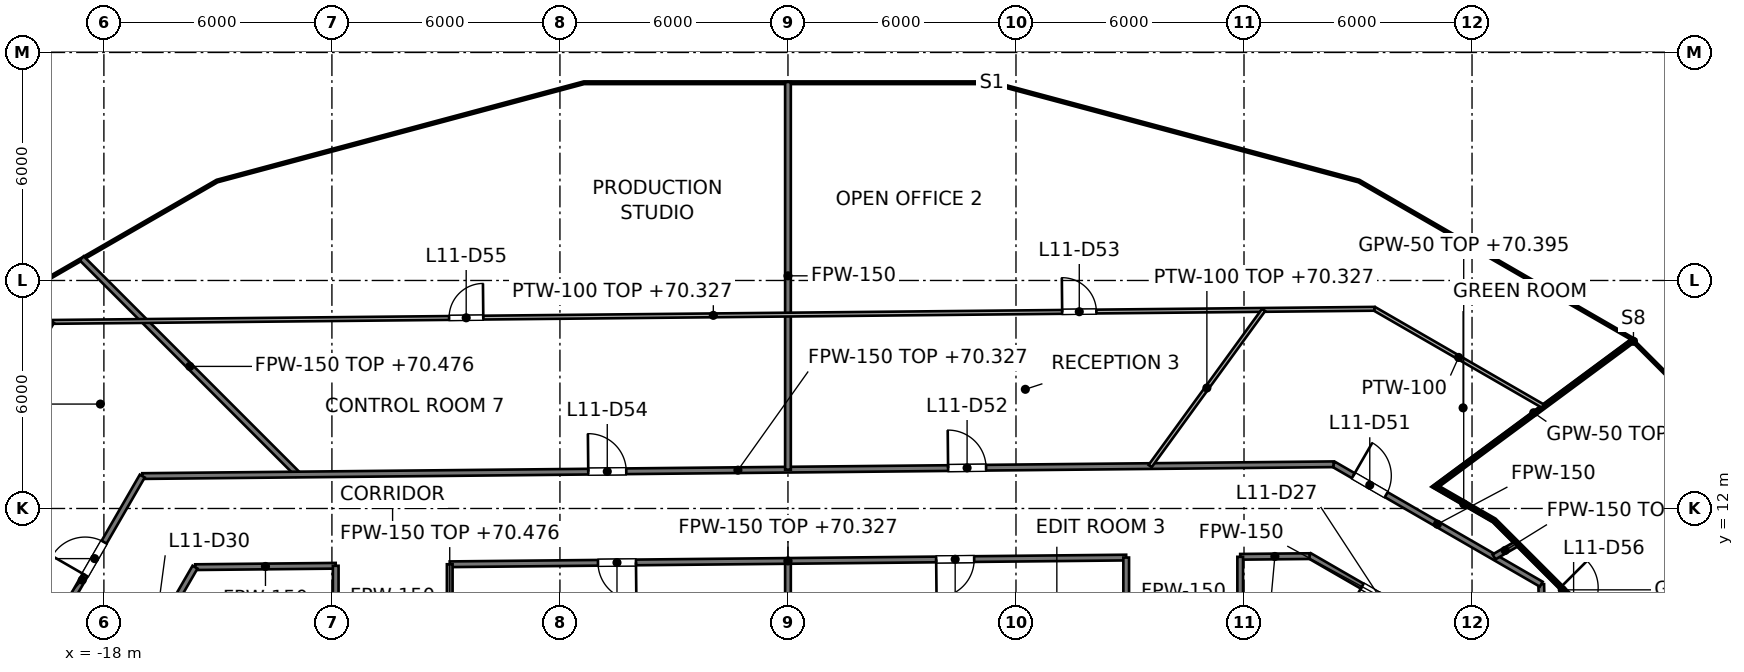
"""IFC4 building model, lengths in metres.
Left out: names, types, materials, properties, quantities, classifications, styles, units other than length and angle.
Written with IfcOpenShell. Run it as: python <this file> out.ifc"""

import sys

from ifc_helpers import new_model, si_unit, direction, frame, frame_2d, origin, place, context, subcontext, project, spatial, rectangle, extrude, element, fill, save


model = new_model("IFC4")
c1 = context("Model", 3, precision=1e-05, world=origin(), true_north=direction((0.0, 1.0)))
c2 = subcontext(c1, "Body", "Model", "MODEL_VIEW")
j1 = project(units=[si_unit("LENGTHUNIT", "METRE"), si_unit("PLANEANGLEUNIT", "RADIAN")], contexts=[c1])
p1 = place(None, origin())
s1 = spatial("IfcSite", under=j1, at=p1, CompositionType="ELEMENT")
p2 = place(p1, origin())
s2 = spatial("IfcBuilding", under=s1, at=p2, CompositionType="ELEMENT")
p3 = place(p2, frame((0.0, 0.0, 67.2)))
s3 = spatial("IfcBuildingStorey", under=s2, at=p3, CompositionType="ELEMENT", Elevation=67.2)
p4 = place(p3, frame((19.821, 10.008, 0.0), z_axis=(0.0, 0.0, 1.0), x_axis=(0.020552957546, -0.999788765658, 0.0)))
e1 = element("IfcWall", 1, at=p4, inside=s3, PredefinedType="PARTITIONING", context=c2, shape_type="SweptSolid", body=[
    extrude(rectangle(XDim=17.343, YDim=0.15, at=frame_2d((8.671, 0.0))), origin(), (0.0, 0.0, 1.0), 3.127),
])
p5 = place(p4, frame((11.677, 0.0, 0.0)))
e2 = element("IfcOpeningElement", 2, at=p5, cuts=e1, PredefinedType="OPENING", context=c2, shape_type="SweptSolid", body=[
    extrude(rectangle(XDim=1.0, YDim=2.1, at=frame_2d((0.5, 1.05))), frame((0.0, 0.075, 0.0), z_axis=(0.0, -1.0, 0.0), x_axis=(1.0, 0.0, 0.0)), (0.0, 0.0, 1.0), 0.15),
])
p6 = place(p4, frame((4.113, 0.0, 0.0)))
e3 = element("IfcOpeningElement", 3, at=p6, cuts=e1, PredefinedType="OPENING", context=c2, shape_type="SweptSolid", body=[
    extrude(rectangle(XDim=1.0, YDim=2.1, at=frame_2d((0.5, 1.05))), frame((0.0, 0.075, 0.0), z_axis=(0.0, -1.0, 0.0), x_axis=(1.0, 0.0, 0.0)), (0.0, 0.0, 1.0), 0.15),
])
p7 = place(p3, frame((-18.584, 18.584, 0.0), z_axis=(0.0, 0.0, 1.0), x_axis=(0.707106781187, -0.707106781187, 0.0)))
e4 = element("IfcWall", 4, at=p7, inside=s3, PredefinedType="PARTITIONING", context=c2, shape_type="SweptSolid", body=[
    extrude(rectangle(XDim=8.047, YDim=0.15, at=frame_2d((4.023, 0.0))), origin(), (0.0, 0.0, 1.0), 3.276),
])
p8 = place(p3, frame((13.724, 10.757, 0.0), z_axis=(0.0, 0.0, 1.0), x_axis=(0.86594264414, -0.500143316521, 0.0)))
e5 = element("IfcWall", 5, at=p8, inside=s3, PredefinedType="PARTITIONING", context=c2, shape_type="SweptSolid", body=[
    extrude(rectangle(XDim=4.302, YDim=0.15, at=frame_2d((2.151, 0.0))), origin(), (0.0, 0.0, 1.0), 3.195),
])
p9 = place(p8, frame((1.602, 0.0, 0.0)))
e6 = element("IfcOpeningElement", 6, at=p9, cuts=e5, PredefinedType="OPENING", context=c2, shape_type="SweptSolid", body=[
    extrude(rectangle(XDim=1.0, YDim=2.1, at=frame_2d((0.5, 1.05))), frame((0.0, 0.075, 0.0), z_axis=(0.0, -1.0, 0.0), x_axis=(1.0, 0.0, 0.0)), (0.0, 0.0, 1.0), 0.15),
])
p10 = place(p3, frame((14.356, 13.164, 0.0), z_axis=(0.0, 0.0, 1.0), x_axis=(0.865974907157, -0.500087452527, 0.0)))
e7 = element("IfcWall", 7, at=p10, inside=s3, PredefinedType="PARTITIONING", context=c2, shape_type="SweptSolid", body=[
    extrude(rectangle(XDim=6.311, YDim=0.15, at=frame_2d((3.155, 0.0))), origin(), (0.0, 0.0, 1.0), 3.195),
])
p11 = place(p10, frame((0.601, 0.0, 0.0)))
e8 = element("IfcOpeningElement", 8, at=p11, cuts=e7, PredefinedType="OPENING", context=c2, shape_type="SweptSolid", body=[
    extrude(rectangle(XDim=1.0, YDim=2.1, at=frame_2d((0.5, 1.05))), frame((0.0, 0.075, 0.0), z_axis=(0.0, -1.0, 0.0), x_axis=(1.0, 0.0, 0.0)), (0.0, 0.0, 1.0), 0.15),
])
p12 = place(p3, frame((-15.597, 10.456, 0.0), z_axis=(0.0, 0.0, 1.0), x_axis=(0.999950943482, 0.009905080996, 0.0)))
e9 = element("IfcWall", 9, at=p12, inside=s3, PredefinedType="PARTITIONING", context=c2, shape_type="SweptSolid", body=[
    extrude(rectangle(XDim=3.697, YDim=0.15, at=frame_2d((1.849, 0.0))), origin(), (0.0, 0.0, 1.0), 3.195),
])
p13 = place(p3, frame((-8.9, 10.532, 0.0), z_axis=(0.0, 0.0, 1.0), x_axis=(0.999950834077, 0.009916119672, 0.0)))
e10 = element("IfcWall", 10, at=p13, inside=s3, PredefinedType="PARTITIONING", context=c2, shape_type="SweptSolid", body=[
    extrude(rectangle(XDim=17.801, YDim=0.15, at=frame_2d((8.9, 0.0))), origin(), (0.0, 0.0, 1.0), 3.127),
])
p14 = place(p13, frame((12.8, 0.0, 0.0)))
e11 = element("IfcOpeningElement", 11, at=p14, cuts=e10, PredefinedType="OPENING", context=c2, shape_type="SweptSolid", body=[
    extrude(rectangle(XDim=1.0, YDim=2.1, at=frame_2d((0.5, 1.05))), frame((0.0, 0.075, 0.0), z_axis=(0.0, -1.0, 0.0), x_axis=(1.0, 0.0, 0.0)), (0.0, 0.0, 1.0), 0.15),
])
p15 = place(p13, frame((3.901, 0.0, 0.0)))
e12 = element("IfcOpeningElement", 12, at=p15, cuts=e10, PredefinedType="OPENING", context=c2, shape_type="SweptSolid", body=[
    extrude(rectangle(XDim=1.0, YDim=2.1, at=frame_2d((0.5, 1.05))), frame((0.0, 0.075, 0.0), z_axis=(0.0, -1.0, 0.0), x_axis=(1.0, 0.0, 0.0)), (0.0, 0.0, 1.0), 0.15),
])
p16 = place(p3, frame((11.9, 10.728, 0.0), z_axis=(0.0, 0.0, 1.0), x_axis=(0.999950962562, 0.009903154608, 0.0)))
e13 = element("IfcWall", 13, at=p16, inside=s3, PredefinedType="PARTITIONING", context=c2, shape_type="SweptSolid", body=[
    extrude(rectangle(XDim=1.824, YDim=0.15, at=frame_2d((0.912, 0.0))), origin(), (0.0, 0.0, 1.0), 4.05),
])
p17 = place(p3, frame((-16.99, 12.853, 0.0), z_axis=(0.0, 0.0, 1.0), x_axis=(0.999950928474, 0.009906596006, 0.0)))
e14 = element("IfcWall", 14, at=p17, inside=s3, PredefinedType="PARTITIONING", context=c2, shape_type="SweptSolid", body=[
    extrude(rectangle(XDim=31.347, YDim=0.15, at=frame_2d((15.674, 0.0))), origin(), (0.0, 0.0, 1.0), 3.127),
])
p18 = place(p17, frame((21.205, 0.0, 0.0)))
e15 = element("IfcOpeningElement", 15, at=p18, cuts=e14, PredefinedType="OPENING", context=c2, shape_type="SweptSolid", body=[
    extrude(rectangle(XDim=1.0, YDim=2.1, at=frame_2d((0.5, 1.05))), frame((0.0, 0.075, 0.0), z_axis=(0.0, -1.0, 0.0), x_axis=(1.0, 0.0, 0.0)), (0.0, 0.0, 1.0), 0.15),
])
p19 = place(p17, frame((11.736, 0.0, 0.0)))
e16 = element("IfcOpeningElement", 16, at=p19, cuts=e14, PredefinedType="OPENING", context=c2, shape_type="SweptSolid", body=[
    extrude(rectangle(XDim=1.0, YDim=2.1, at=frame_2d((0.5, 1.05))), frame((0.0, 0.075, 0.0), z_axis=(0.0, -1.0, 0.0), x_axis=(1.0, 0.0, 0.0)), (0.0, 0.0, 1.0), 0.15),
])
p20 = place(p3, frame((18.578, 10.726, 0.0), z_axis=(0.0, 0.0, 1.0), x_axis=(0.866203514255, 0.499691376644, 0.0)))
e17 = element("IfcWall", 17, at=p20, inside=s3, PredefinedType="PARTITIONING", context=c2, shape_type="SweptSolid", body=[
    extrude(rectangle(XDim=0.68, YDim=0.15, at=frame_2d((0.34, 0.0))), origin(), (0.0, 0.0, 1.0), 4.05),
])
p21 = place(p3, frame((-17.75, 6.737, 0.0), z_axis=(0.0, 0.0, 1.0), x_axis=(0.500038958046, 0.866002910178, 0.0)))
e18 = element("IfcWall", 18, at=p21, inside=s3, PredefinedType="PARTITIONING", context=c2, shape_type="SweptSolid", body=[
    extrude(rectangle(XDim=4.296, YDim=0.15, at=frame_2d((2.148, 0.0))), origin(), (0.0, 0.0, 1.0), 3.195),
])
p22 = place(p21, frame((1.647, 0.0, 0.0)))
e19 = element("IfcOpeningElement", 19, at=p22, cuts=e18, PredefinedType="OPENING", context=c2, shape_type="SweptSolid", body=[
    extrude(rectangle(XDim=1.0, YDim=2.1, at=frame_2d((0.5, 1.05))), frame((0.0, 0.075, 0.0), z_axis=(0.0, -1.0, 0.0), x_axis=(1.0, 0.0, 0.0)), (0.0, 0.0, 1.0), 0.15),
])
p23 = place(p3, frame((-20.15, 7.38, 0.0), z_axis=(0.0, 0.0, 1.0), x_axis=(0.499998889324, 0.866026045033, 0.0)))
e20 = element("IfcWall", 20, at=p23, inside=s3, PredefinedType="PARTITIONING", context=c2, shape_type="SweptSolid", body=[
    extrude(rectangle(XDim=6.32, YDim=0.15, at=frame_2d((3.16, 0.0))), origin(), (0.0, 0.0, 1.0), 3.195),
])
p24 = place(p23, frame((3.312, 0.0, 0.0)))
e21 = element("IfcOpeningElement", 21, at=p24, cuts=e20, PredefinedType="OPENING", context=c2, shape_type="SweptSolid", body=[
    extrude(rectangle(XDim=1.0, YDim=2.1, at=frame_2d((0.5, 1.05))), frame((0.0, 0.075, 0.0), z_axis=(0.0, -1.0, 0.0), x_axis=(1.0, 0.0, 0.0)), (0.0, 0.0, 1.0), 0.15),
])
p25 = place(p3, frame((11.9, 8.0, 0.0), z_axis=(0.0, 0.0, 1.0), x_axis=(0.0, 1.0, 0.0)))
e22 = element("IfcWall", 22, at=p25, inside=s3, PredefinedType="PARTITIONING", context=c2, shape_type="SweptSolid", body=[
    extrude(rectangle(XDim=2.728, YDim=0.15, at=frame_2d((1.364, 0.0))), origin(), (0.0, 0.0, 1.0), 3.195),
])
p26 = place(p3, frame((8.9, 8.0, 0.0), z_axis=(0.0, 0.0, 1.0), x_axis=(0.0, 1.0, 0.0)))
e23 = element("IfcWall", 23, at=p26, inside=s3, PredefinedType="PARTITIONING", context=c2, shape_type="SweptSolid", body=[
    extrude(rectangle(XDim=2.709, YDim=0.15, at=frame_2d((1.354, 0.0))), origin(), (0.0, 0.0, 1.0), 3.276),
])
p27 = place(p3, frame((0.0, 8.0, 0.0), z_axis=(0.0, 0.0, 1.0), x_axis=(0.0, 1.0, 0.0)))
e24 = element("IfcWall", 24, at=p27, inside=s3, PredefinedType="PARTITIONING", context=c2, shape_type="SweptSolid", body=[
    extrude(rectangle(XDim=2.621, YDim=0.15, at=frame_2d((1.311, 0.0))), origin(), (0.0, 0.0, 1.0), 3.195),
])
p28 = place(p3, frame((0.0, 13.022, 0.0), z_axis=(0.0, 0.0, 1.0), x_axis=(0.0, 1.0, 0.0)))
e25 = element("IfcWall", 25, at=p28, inside=s3, PredefinedType="PARTITIONING", context=c2, shape_type="SweptSolid", body=[
    extrude(rectangle(XDim=10.201, YDim=0.15, at=frame_2d((5.101, 0.0))), origin(), (0.0, 0.0, 1.0), 3.195),
])
p29 = place(p3, frame((-8.9, 8.0, 0.0), z_axis=(0.0, 0.0, 1.0), x_axis=(0.0, 1.0, 0.0)))
e26 = element("IfcWall", 26, at=p29, inside=s3, PredefinedType="PARTITIONING", context=c2, shape_type="SweptSolid", body=[
    extrude(rectangle(XDim=2.532, YDim=0.15, at=frame_2d((1.266, 0.0))), origin(), (0.0, 0.0, 1.0), 3.276),
])
p30 = place(p3, frame((-11.9, 8.0, 0.0), z_axis=(0.0, 0.0, 1.0), x_axis=(0.0, 1.0, 0.0)))
e27 = element("IfcWall", 27, at=p30, inside=s3, PredefinedType="PARTITIONING", context=c2, shape_type="SweptSolid", body=[
    extrude(rectangle(XDim=2.492, YDim=0.15, at=frame_2d((1.246, 0.0))), origin(), (0.0, 0.0, 1.0), 3.195),
])
p31 = place(p3, frame((18.569, 11.664, 0.0), z_axis=(0.0, 0.0, 1.0), x_axis=(0.707082870229, -0.707130691335, 0.0)))
e28 = element("IfcWall", 28, at=p31, inside=s3, PredefinedType="PARTITIONING", context=c2, shape_type="SweptSolid", body=[
    extrude(rectangle(XDim=5.105, YDim=0.05, at=frame_2d((2.553, 0.0))), origin(), (0.0, 0.0, 1.0), 3.195),
])
p32 = place(p31, frame((2.476, 0.0, 0.0)))
e29 = element("IfcOpeningElement", 29, at=p32, cuts=e28, PredefinedType="OPENING", context=c2, shape_type="SweptSolid", body=[
    extrude(rectangle(XDim=1.0, YDim=2.1, at=frame_2d((0.5, 1.05))), frame((0.0, 0.025, 0.0), z_axis=(0.0, -1.0, 0.0), x_axis=(1.0, 0.0, 0.0)), (0.0, 0.0, 1.0), 0.05),
])
p33 = place(p3, frame((16.993, 12.574, 0.0), z_axis=(0.0, 0.0, 1.0), x_axis=(0.866047089031, -0.499962438169, 0.0)))
e30 = element("IfcWall", 30, at=p33, inside=s3, PredefinedType="PARTITIONING", context=c2, shape_type="SweptSolid", body=[
    extrude(rectangle(XDim=1.82, YDim=0.05, at=frame_2d((0.91, 0.0))), origin(), (0.0, 0.0, 1.0), 3.195),
])
p34 = place(p3, frame((16.993, 12.574, 0.0), z_axis=(0.0, 0.0, 1.0), x_axis=(0.803936452666, 0.594715209218, 0.0)))
e31 = element("IfcWall", 31, at=p34, inside=s3, PredefinedType="PARTITIONING", context=c2, shape_type="SweptSolid", body=[
    extrude(rectangle(XDim=6.543, YDim=0.05, at=frame_2d((3.271, 0.0))), origin(), (0.0, 0.0, 1.0), 3.195),
])
p35 = place(p3, frame((15.431, 17.255, 0.0), z_axis=(0.0, 0.0, 1.0), x_axis=(0.865949570576, -0.500131323973, 0.0)))
e32 = element("IfcWall", 32, at=p35, inside=s3, PredefinedType="PARTITIONING", context=c2, shape_type="SweptSolid", body=[
    extrude(rectangle(XDim=5.117, YDim=0.1, at=frame_2d((2.558, 0.0))), origin(), (0.0, 0.0, 1.0), 3.195),
])
p36 = place(p3, frame((-19.359, 16.91, 0.0), z_axis=(0.0, 0.0, 1.0), x_axis=(0.999950841495, 0.00991537161, 0.0)))
e33 = element("IfcWall", 33, at=p36, inside=s3, PredefinedType="PARTITIONING", context=c2, shape_type="SweptSolid", body=[
    extrude(rectangle(XDim=34.792, YDim=0.1, at=frame_2d((17.396, 0.0))), origin(), (0.0, 0.0, 1.0), 3.127),
])
p37 = place(p36, frame((26.576, 0.0, 0.0)))
e34 = element("IfcOpeningElement", 34, at=p37, cuts=e33, PredefinedType="OPENING", context=c2, shape_type="SweptSolid", body=[
    extrude(rectangle(XDim=0.9, YDim=2.1, at=frame_2d((0.45, 1.05))), frame((0.0, 0.05, 0.0), z_axis=(0.0, -1.0, 0.0), x_axis=(1.0, 0.0, 0.0)), (0.0, 0.0, 1.0), 0.1),
])
p38 = place(p36, frame((10.443, 0.0, 0.0)))
e35 = element("IfcOpeningElement", 35, at=p38, cuts=e33, PredefinedType="OPENING", context=c2, shape_type="SweptSolid", body=[
    extrude(rectangle(XDim=0.9, YDim=2.1, at=frame_2d((0.45, 1.05))), frame((0.0, 0.05, 0.0), z_axis=(0.0, -1.0, 0.0), x_axis=(1.0, 0.0, 0.0)), (0.0, 0.0, 1.0), 0.1),
])
p39 = place(p3, frame((9.53, 13.116, 0.0), z_axis=(0.0, 0.0, 1.0), x_axis=(0.587774449377, 0.809024843043, 0.0)))
e36 = element("IfcWall", 36, at=p39, inside=s3, PredefinedType="PARTITIONING", context=c2, shape_type="SweptSolid", body=[
    extrude(rectangle(XDim=5.08, YDim=0.1, at=frame_2d((2.54, 0.0))), origin(), (0.0, 0.0, 1.0), 3.127),
])
p40 = place(p3, frame((-24.23, 8.473, 0.0), z_axis=(0.0, 0.0, 1.0), x_axis=(0.50004711357, 0.865998201044, 0.0)))
e37 = element("IfcWall", 37, at=p40, inside=s3, PredefinedType="PARTITIONING", context=c2, shape_type="SweptSolid", body=[
    extrude(rectangle(XDim=9.742, YDim=0.1, at=frame_2d((4.871, 0.0))), origin(), (0.0, 0.0, 1.0), 3.195),
])
p41 = place(p9, origin())
e38 = element("IfcDoor", 38, at=p41, inside=s3, OperationType="SINGLE_SWING_LEFT", PredefinedType="DOOR", context=c2, shape_type="SweptSolid", body=[
    extrude(rectangle(XDim=1.0, YDim=2.1, at=frame_2d((0.5, 1.05))), frame((0.0, 0.025, 0.0), z_axis=(0.0, -1.0, 0.0), x_axis=(1.0, 0.0, 0.0)), (0.0, 0.0, 1.0), 0.05),
])
fill(e6, e38)
p42 = place(p14, origin())
e39 = element("IfcDoor", 39, at=p42, inside=s3, OperationType="SINGLE_SWING_LEFT", PredefinedType="DOOR", context=c2, shape_type="SweptSolid", body=[
    extrude(rectangle(XDim=1.0, YDim=2.1, at=frame_2d((0.5, 1.05))), frame((0.0, 0.025, 0.0), z_axis=(0.0, -1.0, 0.0), x_axis=(1.0, 0.0, 0.0)), (0.0, 0.0, 1.0), 0.05),
])
fill(e11, e39)
p43 = place(p15, origin())
e40 = element("IfcDoor", 40, at=p43, inside=s3, OperationType="SINGLE_SWING_RIGHT", PredefinedType="DOOR", context=c2, shape_type="SweptSolid", body=[
    extrude(rectangle(XDim=1.0, YDim=2.1, at=frame_2d((0.5, 1.05))), frame((0.0, 0.025, 0.0), z_axis=(0.0, -1.0, 0.0), x_axis=(1.0, 0.0, 0.0)), (0.0, 0.0, 1.0), 0.05),
])
fill(e12, e40)
p44 = place(p24, origin())
e41 = element("IfcDoor", 41, at=p44, inside=s3, OperationType="SINGLE_SWING_LEFT", PredefinedType="DOOR", context=c2, shape_type="SweptSolid", body=[
    extrude(rectangle(XDim=1.0, YDim=2.1, at=frame_2d((0.5, 1.05))), frame((0.0, 0.025, 0.0), z_axis=(0.0, -1.0, 0.0), x_axis=(1.0, 0.0, 0.0)), (0.0, 0.0, 1.0), 0.05),
])
fill(e21, e41)
p45 = place(p11, origin())
e42 = element("IfcDoor", 42, at=p45, inside=s3, OperationType="SINGLE_SWING_LEFT", PredefinedType="DOOR", context=c2, shape_type="SweptSolid", body=[
    extrude(rectangle(XDim=1.0, YDim=2.1, at=frame_2d((0.5, 1.05))), frame((0.0, 0.025, 0.0), z_axis=(0.0, -1.0, 0.0), x_axis=(1.0, 0.0, 0.0)), (0.0, 0.0, 1.0), 0.05),
])
fill(e8, e42)
p46 = place(p18, origin())
e43 = element("IfcDoor", 43, at=p46, inside=s3, OperationType="SINGLE_SWING_LEFT", PredefinedType="DOOR", context=c2, shape_type="SweptSolid", body=[
    extrude(rectangle(XDim=1.0, YDim=2.1, at=frame_2d((0.5, 1.05))), frame((0.0, 0.025, 0.0), z_axis=(0.0, -1.0, 0.0), x_axis=(1.0, 0.0, 0.0)), (0.0, 0.0, 1.0), 0.05),
])
fill(e15, e43)
p47 = place(p37, origin())
e44 = element("IfcDoor", 44, at=p47, inside=s3, OperationType="SINGLE_SWING_LEFT", PredefinedType="DOOR", context=c2, shape_type="SweptSolid", body=[
    extrude(rectangle(XDim=0.9, YDim=2.1, at=frame_2d((0.45, 1.05))), frame((0.0, 0.025, 0.0), z_axis=(0.0, -1.0, 0.0), x_axis=(1.0, 0.0, 0.0)), (0.0, 0.0, 1.0), 0.05),
])
fill(e34, e44)
p48 = place(p19, origin())
e45 = element("IfcDoor", 45, at=p48, inside=s3, OperationType="SINGLE_SWING_LEFT", PredefinedType="DOOR", context=c2, shape_type="SweptSolid", body=[
    extrude(rectangle(XDim=1.0, YDim=2.1, at=frame_2d((0.5, 1.05))), frame((0.0, 0.025, 0.0), z_axis=(0.0, -1.0, 0.0), x_axis=(1.0, 0.0, 0.0)), (0.0, 0.0, 1.0), 0.05),
])
fill(e16, e45)
p49 = place(p38, origin())
e46 = element("IfcDoor", 46, at=p49, inside=s3, OperationType="SINGLE_SWING_RIGHT", PredefinedType="DOOR", context=c2, shape_type="SweptSolid", body=[
    extrude(rectangle(XDim=0.9, YDim=2.1, at=frame_2d((0.45, 1.05))), frame((0.0, 0.025, 0.0), z_axis=(0.0, -1.0, 0.0), x_axis=(1.0, 0.0, 0.0)), (0.0, 0.0, 1.0), 0.05),
])
fill(e35, e46)
p50 = place(p32, origin())
e47 = element("IfcDoor", 47, at=p50, inside=s3, OperationType="SINGLE_SWING_LEFT", PredefinedType="DOOR", context=c2, shape_type="SweptSolid", body=[
    extrude(rectangle(XDim=1.0, YDim=2.1, at=frame_2d((0.5, 1.05))), frame((0.0, 0.025, 0.0), z_axis=(0.0, -1.0, 0.0), x_axis=(1.0, 0.0, 0.0)), (0.0, 0.0, 1.0), 0.05),
])
fill(e29, e47)
save(model, sys.argv[1])
